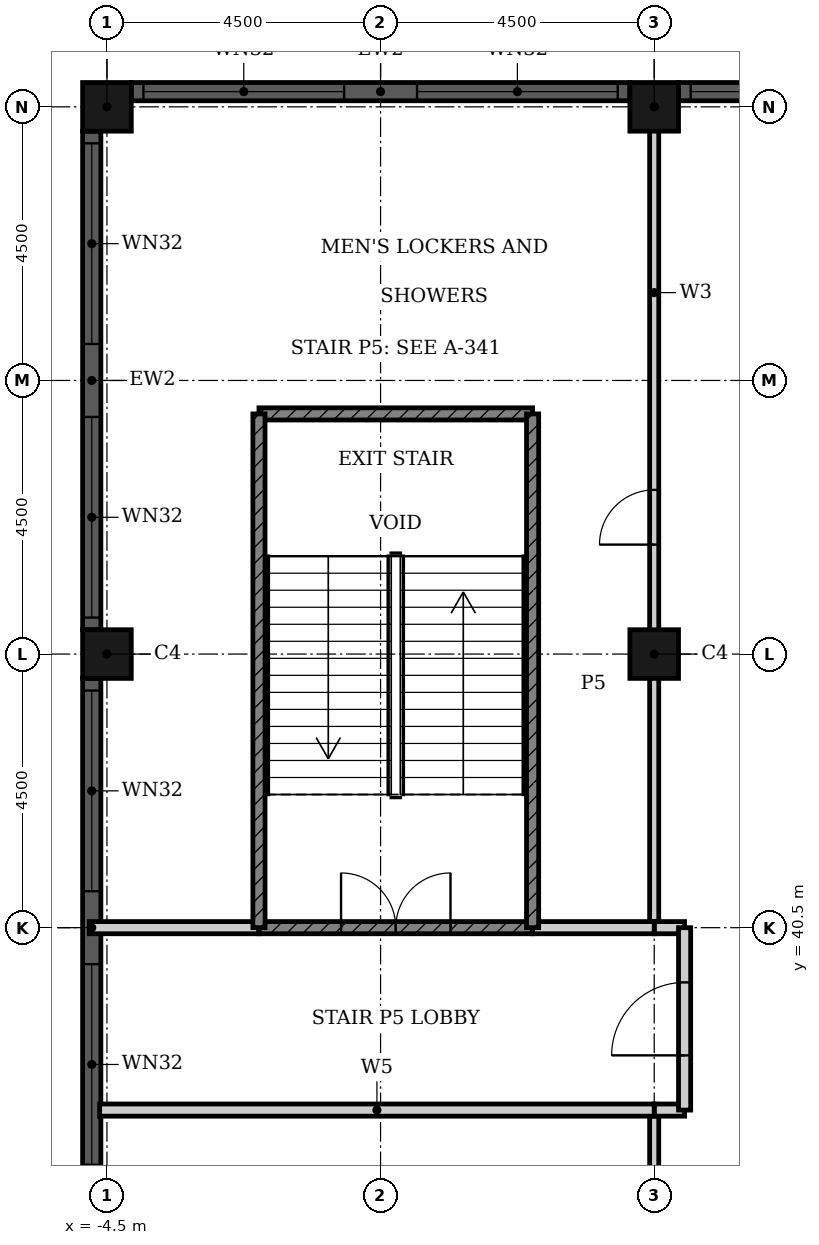
"""IFC4 building model, lengths in metres.
Left out: names, types, materials, properties, quantities, classifications, styles, units other than length and angle.
Written with IfcOpenShell. Run it as: python <this file> out.ifc"""

import sys

from ifc_helpers import new_model, si_unit, direction, frame, frame_2d, origin, origin_2d, place, context, subcontext, project, spatial, rectangle, hollow_rectangle, extrude, element, fill, save


model = new_model("IFC4")
c1 = context("Model", 3, precision=1e-05, world=origin(), true_north=direction((0.0, 1.0)))
c2 = subcontext(c1, "Body", "Model", "MODEL_VIEW")
j1 = project(units=[si_unit("LENGTHUNIT", "METRE"), si_unit("PLANEANGLEUNIT", "RADIAN")], contexts=[c1])
p1 = place(None, origin())
s1 = spatial("IfcSite", under=j1, at=p1, CompositionType="ELEMENT")
p2 = place(p1, origin())
s2 = spatial("IfcBuilding", under=s1, at=p2, CompositionType="ELEMENT")
p3 = place(p2, frame((0.0, 0.0, 24.0)))
s3 = spatial("IfcBuildingStorey", under=s2, at=p3, CompositionType="ELEMENT", Elevation=24.0)
for number, where, z_axis, x_axis in (
    (1, (-4.5, 45.0, 0.0), (0.0, 0.0, 1.0), (1.0, 0.0, 0.0)),
    (2, (-4.5, 54.0, 0.0), (0.0, 0.0, 1.0), (1.0, 0.0, 0.0)),
    (3, (4.5, 54.0, 0.0), (0.0, 0.0, 1.0), (1.0, 0.0, 0.0)),
    (4, (4.5, 45.0, 0.0), (0.0, 0.0, 1.0), (1.0, 0.0, 0.0)),
):
    element("IfcColumn", number, at=place(p3, frame(where, z_axis=z_axis, x_axis=x_axis)), inside=s3, PredefinedType="COLUMN", context=c2, shape_type="SweptSolid", body=[
        extrude(hollow_rectangle(XDim=0.8, YDim=0.8, WallThickness=0.025, at=origin_2d()), origin(), (0.0, 0.0, 1.0), 4.8),
    ])
p4 = place(p3, frame((13.1, 54.25, 0.0), z_axis=(0.0, 0.0, 1.0), x_axis=(-1.0, 0.0, 0.0)))
e5 = element("IfcWall", 5, at=p4, inside=s3, PredefinedType="SOLIDWALL", context=c2, shape_type="SweptSolid", body=[
    extrude(rectangle(XDim=8.2, YDim=0.3, at=frame_2d((4.1, 0.0))), origin(), (0.0, 0.0, 1.0), 4.8),
])
p5 = place(p4, frame((0.2, 0.0, 0.9)))
e6 = element("IfcOpeningElement", 6, at=p5, cuts=e5, PredefinedType="OPENING", context=c2, shape_type="SweptSolid", body=[
    extrude(rectangle(XDim=3.3, YDim=2.9, at=frame_2d((1.65, 1.45))), frame((0.0, 0.16, 0.0), z_axis=(0.0, -1.0, 0.0), x_axis=(1.0, 0.0, 0.0)), (0.0, 0.0, 1.0), 0.32),
])
p6 = place(p4, frame((4.7, 0.0, 0.9)))
e7 = element("IfcOpeningElement", 7, at=p6, cuts=e5, PredefinedType="OPENING", context=c2, shape_type="SweptSolid", body=[
    extrude(rectangle(XDim=3.3, YDim=2.9, at=frame_2d((1.65, 1.45))), frame((0.0, 0.16, 0.0), z_axis=(0.0, -1.0, 0.0), x_axis=(1.0, 0.0, 0.0)), (0.0, 0.0, 1.0), 0.32),
])
p7 = place(p3, frame((4.1, 54.25, 0.0), z_axis=(0.0, 0.0, 1.0), x_axis=(-1.0, 0.0, 0.0)))
e8 = element("IfcWall", 8, at=p7, inside=s3, PredefinedType="SOLIDWALL", context=c2, shape_type="SweptSolid", body=[
    extrude(rectangle(XDim=8.2, YDim=0.3, at=frame_2d((4.1, 0.0))), origin(), (0.0, 0.0, 1.0), 4.8),
])
p8 = place(p7, frame((0.2, 0.0, 0.9)))
e9 = element("IfcOpeningElement", 9, at=p8, cuts=e8, PredefinedType="OPENING", context=c2, shape_type="SweptSolid", body=[
    extrude(rectangle(XDim=3.3, YDim=2.9, at=frame_2d((1.65, 1.45))), frame((0.0, 0.16, 0.0), z_axis=(0.0, -1.0, 0.0), x_axis=(1.0, 0.0, 0.0)), (0.0, 0.0, 1.0), 0.32),
])
p9 = place(p7, frame((4.7, 0.0, 0.9)))
e10 = element("IfcOpeningElement", 10, at=p9, cuts=e8, PredefinedType="OPENING", context=c2, shape_type="SweptSolid", body=[
    extrude(rectangle(XDim=3.3, YDim=2.9, at=frame_2d((1.65, 1.45))), frame((0.0, 0.16, 0.0), z_axis=(0.0, -1.0, 0.0), x_axis=(1.0, 0.0, 0.0)), (0.0, 0.0, 1.0), 0.32),
])
p10 = place(p3, frame((-4.75, 53.6, 0.0), z_axis=(0.0, 0.0, 1.0), x_axis=(0.0, -1.0, 0.0)))
e11 = element("IfcWall", 11, at=p10, inside=s3, PredefinedType="SOLIDWALL", context=c2, shape_type="SweptSolid", body=[
    extrude(rectangle(XDim=8.2, YDim=0.3, at=frame_2d((4.1, 0.0))), origin(), (0.0, 0.0, 1.0), 4.8),
])
p11 = place(p10, frame((0.2, 0.0, 0.9)))
e12 = element("IfcOpeningElement", 12, at=p11, cuts=e11, PredefinedType="OPENING", context=c2, shape_type="SweptSolid", body=[
    extrude(rectangle(XDim=3.3, YDim=2.9, at=frame_2d((1.65, 1.45))), frame((0.0, 0.16, 0.0), z_axis=(0.0, -1.0, 0.0), x_axis=(1.0, 0.0, 0.0)), (0.0, 0.0, 1.0), 0.32),
])
p12 = place(p10, frame((4.7, 0.0, 0.9)))
e13 = element("IfcOpeningElement", 13, at=p12, cuts=e11, PredefinedType="OPENING", context=c2, shape_type="SweptSolid", body=[
    extrude(rectangle(XDim=3.3, YDim=2.9, at=frame_2d((1.65, 1.45))), frame((0.0, 0.16, 0.0), z_axis=(0.0, -1.0, 0.0), x_axis=(1.0, 0.0, 0.0)), (0.0, 0.0, 1.0), 0.32),
])
p13 = place(p3, frame((-4.75, 44.6, 0.0), z_axis=(0.0, 0.0, 1.0), x_axis=(0.0, -1.0, 0.0)))
e14 = element("IfcWall", 14, at=p13, inside=s3, PredefinedType="SOLIDWALL", context=c2, shape_type="SweptSolid", body=[
    extrude(rectangle(XDim=8.2, YDim=0.3, at=frame_2d((4.1, 0.0))), origin(), (0.0, 0.0, 1.0), 4.8),
])
p14 = place(p13, frame((0.2, 0.0, 0.9)))
e15 = element("IfcOpeningElement", 15, at=p14, cuts=e14, PredefinedType="OPENING", context=c2, shape_type="SweptSolid", body=[
    extrude(rectangle(XDim=3.3, YDim=2.9, at=frame_2d((1.65, 1.45))), frame((0.0, 0.16, 0.0), z_axis=(0.0, -1.0, 0.0), x_axis=(1.0, 0.0, 0.0)), (0.0, 0.0, 1.0), 0.32),
])
p15 = place(p13, frame((4.7, 0.0, 0.9)))
e16 = element("IfcOpeningElement", 16, at=p15, cuts=e14, PredefinedType="OPENING", context=c2, shape_type="SweptSolid", body=[
    extrude(rectangle(XDim=3.3, YDim=2.9, at=frame_2d((1.65, 1.45))), frame((0.0, 0.16, 0.0), z_axis=(0.0, -1.0, 0.0), x_axis=(1.0, 0.0, 0.0)), (0.0, 0.0, 1.0), 0.32),
])
p16 = place(p3, frame((4.5, 30.4, 0.0), z_axis=(0.0, 0.0, 1.0), x_axis=(0.0, 1.0, 0.0)))
e17 = element("IfcWall", 17, at=p16, inside=s3, PredefinedType="PARTITIONING", context=c2, shape_type="SweptSolid", body=[
    extrude(rectangle(XDim=7.1, YDim=0.15, at=frame_2d((3.55, 0.0))), origin(), (0.0, 0.0, 1.0), 4.45),
])
p17 = place(p16, frame((4.0, 0.0, 0.0)))
e18 = element("IfcOpeningElement", 18, at=p17, cuts=e17, PredefinedType="OPENING", context=c2, shape_type="SweptSolid", body=[
    extrude(rectangle(XDim=0.9, YDim=2.1, at=frame_2d((0.45, 1.05))), frame((0.0, 0.085, 0.0), z_axis=(0.0, -1.0, 0.0), x_axis=(1.0, 0.0, 0.0)), (0.0, 0.0, 1.0), 0.17),
])
p18 = place(p3, frame((4.5, 40.5, 0.0), z_axis=(0.0, 0.0, 1.0), x_axis=(0.0, 1.0, 0.0)))
e19 = element("IfcWall", 19, at=p18, inside=s3, PredefinedType="PARTITIONING", context=c2, shape_type="SweptSolid", body=[
    extrude(rectangle(XDim=13.69, YDim=0.15, at=frame_2d((6.845, 0.0))), origin(), (0.0, 0.0, 1.0), 4.45),
])
p19 = place(p18, frame((6.3, 0.0, 0.0)))
e20 = element("IfcOpeningElement", 20, at=p19, cuts=e19, PredefinedType="OPENING", context=c2, shape_type="SweptSolid", body=[
    extrude(rectangle(XDim=0.9, YDim=2.1, at=frame_2d((0.45, 1.05))), frame((0.0, 0.085, 0.0), z_axis=(0.0, -1.0, 0.0), x_axis=(1.0, 0.0, 0.0)), (0.0, 0.0, 1.0), 0.17),
])
p20 = place(p3, frame((4.5, 37.5, 0.0), z_axis=(0.0, 0.0, 1.0), x_axis=(1.0, 0.0, 0.0)))
e21 = element("IfcWall", 21, at=p20, inside=s3, PredefinedType="PARTITIONING", context=c2, shape_type="SweptSolid", body=[
    extrude(rectangle(XDim=0.5, YDim=0.2, at=frame_2d((0.25, 0.0))), origin(), (0.0, 0.0, 1.0), 4.45),
])
p21 = place(p3, frame((-4.62, 37.5, 0.0), z_axis=(0.0, 0.0, 1.0), x_axis=(1.0, 0.0, 0.0)))
e22 = element("IfcWall", 22, at=p21, inside=s3, PredefinedType="PARTITIONING", context=c2, shape_type="SweptSolid", body=[
    extrude(rectangle(XDim=9.12, YDim=0.2, at=frame_2d((4.56, 0.0))), origin(), (0.0, 0.0, 1.0), 4.45),
])
p22 = place(p3, frame((4.5, 40.5, 0.0), z_axis=(0.0, 0.0, 1.0), x_axis=(1.0, 0.0, 0.0)))
e23 = element("IfcWall", 23, at=p22, inside=s3, PredefinedType="PARTITIONING", context=c2, shape_type="SweptSolid", body=[
    extrude(rectangle(XDim=0.5, YDim=0.2, at=frame_2d((0.25, 0.0))), origin(), (0.0, 0.0, 1.0), 4.45),
])
p23 = place(p3, frame((-4.79, 40.5, 0.0), z_axis=(0.0, 0.0, 1.0), x_axis=(1.0, 0.0, 0.0)))
e24 = element("IfcWall", 24, at=p23, inside=s3, PredefinedType="PARTITIONING", context=c2, shape_type="SweptSolid", body=[
    extrude(rectangle(XDim=2.79, YDim=0.2, at=frame_2d((1.395, 0.0))), origin(), (0.0, 0.0, 1.0), 4.45),
])
p24 = place(p3, frame((2.5, 40.5, 0.0), z_axis=(0.0, 0.0, 1.0), x_axis=(1.0, 0.0, 0.0)))
e25 = element("IfcWall", 25, at=p24, inside=s3, PredefinedType="PARTITIONING", context=c2, shape_type="SweptSolid", body=[
    extrude(rectangle(XDim=2.0, YDim=0.2, at=frame_2d((1.0, 0.0))), origin(), (0.0, 0.0, 1.0), 4.45),
])
p25 = place(p3, frame((5.0, 37.5, 0.0), z_axis=(0.0, 0.0, 1.0), x_axis=(0.0, 1.0, 0.0)))
e26 = element("IfcWall", 26, at=p25, inside=s3, PredefinedType="PARTITIONING", context=c2, shape_type="SweptSolid", body=[
    extrude(rectangle(XDim=3.0, YDim=0.2, at=frame_2d((1.5, 0.0))), origin(), (0.0, 0.0, 1.0), 4.45),
])
p26 = place(p25, frame((0.9, 0.0, 0.0)))
e27 = element("IfcOpeningElement", 27, at=p26, cuts=e26, PredefinedType="OPENING", context=c2, shape_type="SweptSolid", body=[
    extrude(rectangle(XDim=1.2, YDim=2.1, at=frame_2d((0.6, 1.05))), frame((0.0, 0.11, 0.0), z_axis=(0.0, -1.0, 0.0), x_axis=(1.0, 0.0, 0.0)), (0.0, 0.0, 1.0), 0.22),
])
p27 = place(p3, frame((-2.0, 40.5, 0.0), z_axis=(0.0, 0.0, 1.0), x_axis=(1.0, 0.0, 0.0)))
e28 = element("IfcWall", 28, at=p27, inside=s3, PredefinedType="SHEAR", context=c2, shape_type="SweptSolid", body=[
    extrude(rectangle(XDim=4.5, YDim=0.2, at=frame_2d((2.25, 0.0))), origin(), (0.0, 0.0, 1.0), 4.45),
])
p28 = place(p27, frame((1.35, 0.0, 0.0)))
e29 = element("IfcOpeningElement", 29, at=p28, cuts=e28, PredefinedType="OPENING", context=c2, shape_type="SweptSolid", body=[
    extrude(rectangle(XDim=1.8, YDim=2.1, at=frame_2d((0.9, 1.05))), frame((0.0, 0.11, 0.0), z_axis=(0.0, -1.0, 0.0), x_axis=(1.0, 0.0, 0.0)), (0.0, 0.0, 1.0), 0.22),
])
p29 = place(p3, frame((-2.0, 48.95, 0.0), z_axis=(0.0, 0.0, 1.0), x_axis=(1.0, 0.0, 0.0)))
e30 = element("IfcWall", 30, at=p29, inside=s3, PredefinedType="SHEAR", context=c2, shape_type="SweptSolid", body=[
    extrude(rectangle(XDim=4.5, YDim=0.2, at=frame_2d((2.25, 0.0))), origin(), (0.0, 0.0, 1.0), 4.45),
])
for number, where, z_axis, x_axis in (
    (31, (-2.0, 40.5, 0.0), (0.0, 0.0, 1.0), (0.0, 1.0, 0.0)),
    (32, (2.5, 40.5, 0.0), (0.0, 0.0, 1.0), (0.0, 1.0, 0.0)),
):
    element("IfcWall", number, at=place(p3, frame(where, z_axis=z_axis, x_axis=x_axis)), inside=s3, PredefinedType="SHEAR", context=c2, shape_type="SweptSolid", body=[
        extrude(rectangle(XDim=8.45, YDim=0.2, at=frame_2d((4.225, 0.0))), origin(), (0.0, 0.0, 1.0), 4.45),
    ])
p30 = place(p6, origin())
e33 = element("IfcWindow", 33, at=p30, inside=s3, PartitioningType="SINGLE_PANEL", PredefinedType="WINDOW", context=c2, shape_type="SweptSolid", body=[
    extrude(rectangle(XDim=3.3, YDim=2.9, at=frame_2d((1.65, 1.45))), frame((0.0, 0.03, 0.0), z_axis=(0.0, -1.0, 0.0), x_axis=(1.0, 0.0, 0.0)), (0.0, 0.0, 1.0), 0.06),
])
fill(e7, e33)
p31 = place(p8, origin())
e34 = element("IfcWindow", 34, at=p31, inside=s3, PartitioningType="SINGLE_PANEL", PredefinedType="WINDOW", context=c2, shape_type="SweptSolid", body=[
    extrude(rectangle(XDim=3.3, YDim=2.9, at=frame_2d((1.65, 1.45))), frame((0.0, 0.03, 0.0), z_axis=(0.0, -1.0, 0.0), x_axis=(1.0, 0.0, 0.0)), (0.0, 0.0, 1.0), 0.06),
])
fill(e9, e34)
p32 = place(p9, origin())
e35 = element("IfcWindow", 35, at=p32, inside=s3, PartitioningType="SINGLE_PANEL", PredefinedType="WINDOW", context=c2, shape_type="SweptSolid", body=[
    extrude(rectangle(XDim=3.3, YDim=2.9, at=frame_2d((1.65, 1.45))), frame((0.0, 0.03, 0.0), z_axis=(0.0, -1.0, 0.0), x_axis=(1.0, 0.0, 0.0)), (0.0, 0.0, 1.0), 0.06),
])
fill(e10, e35)
p33 = place(p11, origin())
e36 = element("IfcWindow", 36, at=p33, inside=s3, PartitioningType="SINGLE_PANEL", PredefinedType="WINDOW", context=c2, shape_type="SweptSolid", body=[
    extrude(rectangle(XDim=3.3, YDim=2.9, at=frame_2d((1.65, 1.45))), frame((0.0, 0.03, 0.0), z_axis=(0.0, -1.0, 0.0), x_axis=(1.0, 0.0, 0.0)), (0.0, 0.0, 1.0), 0.06),
])
fill(e12, e36)
p34 = place(p12, origin())
e37 = element("IfcWindow", 37, at=p34, inside=s3, PartitioningType="SINGLE_PANEL", PredefinedType="WINDOW", context=c2, shape_type="SweptSolid", body=[
    extrude(rectangle(XDim=3.3, YDim=2.9, at=frame_2d((1.65, 1.45))), frame((0.0, 0.03, 0.0), z_axis=(0.0, -1.0, 0.0), x_axis=(1.0, 0.0, 0.0)), (0.0, 0.0, 1.0), 0.06),
])
fill(e13, e37)
p35 = place(p14, origin())
e38 = element("IfcWindow", 38, at=p35, inside=s3, PartitioningType="SINGLE_PANEL", PredefinedType="WINDOW", context=c2, shape_type="SweptSolid", body=[
    extrude(rectangle(XDim=3.3, YDim=2.9, at=frame_2d((1.65, 1.45))), frame((0.0, 0.03, 0.0), z_axis=(0.0, -1.0, 0.0), x_axis=(1.0, 0.0, 0.0)), (0.0, 0.0, 1.0), 0.06),
])
fill(e15, e38)
p36 = place(p15, origin())
e39 = element("IfcWindow", 39, at=p36, inside=s3, PartitioningType="SINGLE_PANEL", PredefinedType="WINDOW", context=c2, shape_type="SweptSolid", body=[
    extrude(rectangle(XDim=3.3, YDim=2.9, at=frame_2d((1.65, 1.45))), frame((0.0, 0.03, 0.0), z_axis=(0.0, -1.0, 0.0), x_axis=(1.0, 0.0, 0.0)), (0.0, 0.0, 1.0), 0.06),
])
fill(e16, e39)
p37 = place(p26, origin())
e40 = element("IfcDoor", 40, at=p37, inside=s3, OperationType="SINGLE_SWING_LEFT", PredefinedType="DOOR", context=c2, shape_type="SweptSolid", body=[
    extrude(rectangle(XDim=1.2, YDim=2.1, at=frame_2d((0.6, 1.05))), frame((0.0, 0.025, 0.0), z_axis=(0.0, -1.0, 0.0), x_axis=(1.0, 0.0, 0.0)), (0.0, 0.0, 1.0), 0.05),
])
fill(e27, e40)
p38 = place(p28, origin())
e41 = element("IfcDoor", 41, at=p38, inside=s3, OperationType="DOUBLE_DOOR_SINGLE_SWING", PredefinedType="DOOR", context=c2, shape_type="SweptSolid", body=[
    extrude(rectangle(XDim=1.8, YDim=2.1, at=frame_2d((0.9, 1.05))), frame((0.0, 0.025, 0.0), z_axis=(0.0, -1.0, 0.0), x_axis=(1.0, 0.0, 0.0)), (0.0, 0.0, 1.0), 0.05),
])
fill(e29, e41)
p39 = place(p19, origin())
e42 = element("IfcDoor", 42, at=p39, inside=s3, OperationType="SINGLE_SWING_RIGHT", PredefinedType="DOOR", context=c2, shape_type="SweptSolid", body=[
    extrude(rectangle(XDim=0.9, YDim=2.1, at=frame_2d((0.45, 1.05))), frame((0.0, 0.025, 0.0), z_axis=(0.0, -1.0, 0.0), x_axis=(1.0, 0.0, 0.0)), (0.0, 0.0, 1.0), 0.05),
])
fill(e20, e42)
save(model, sys.argv[1])
